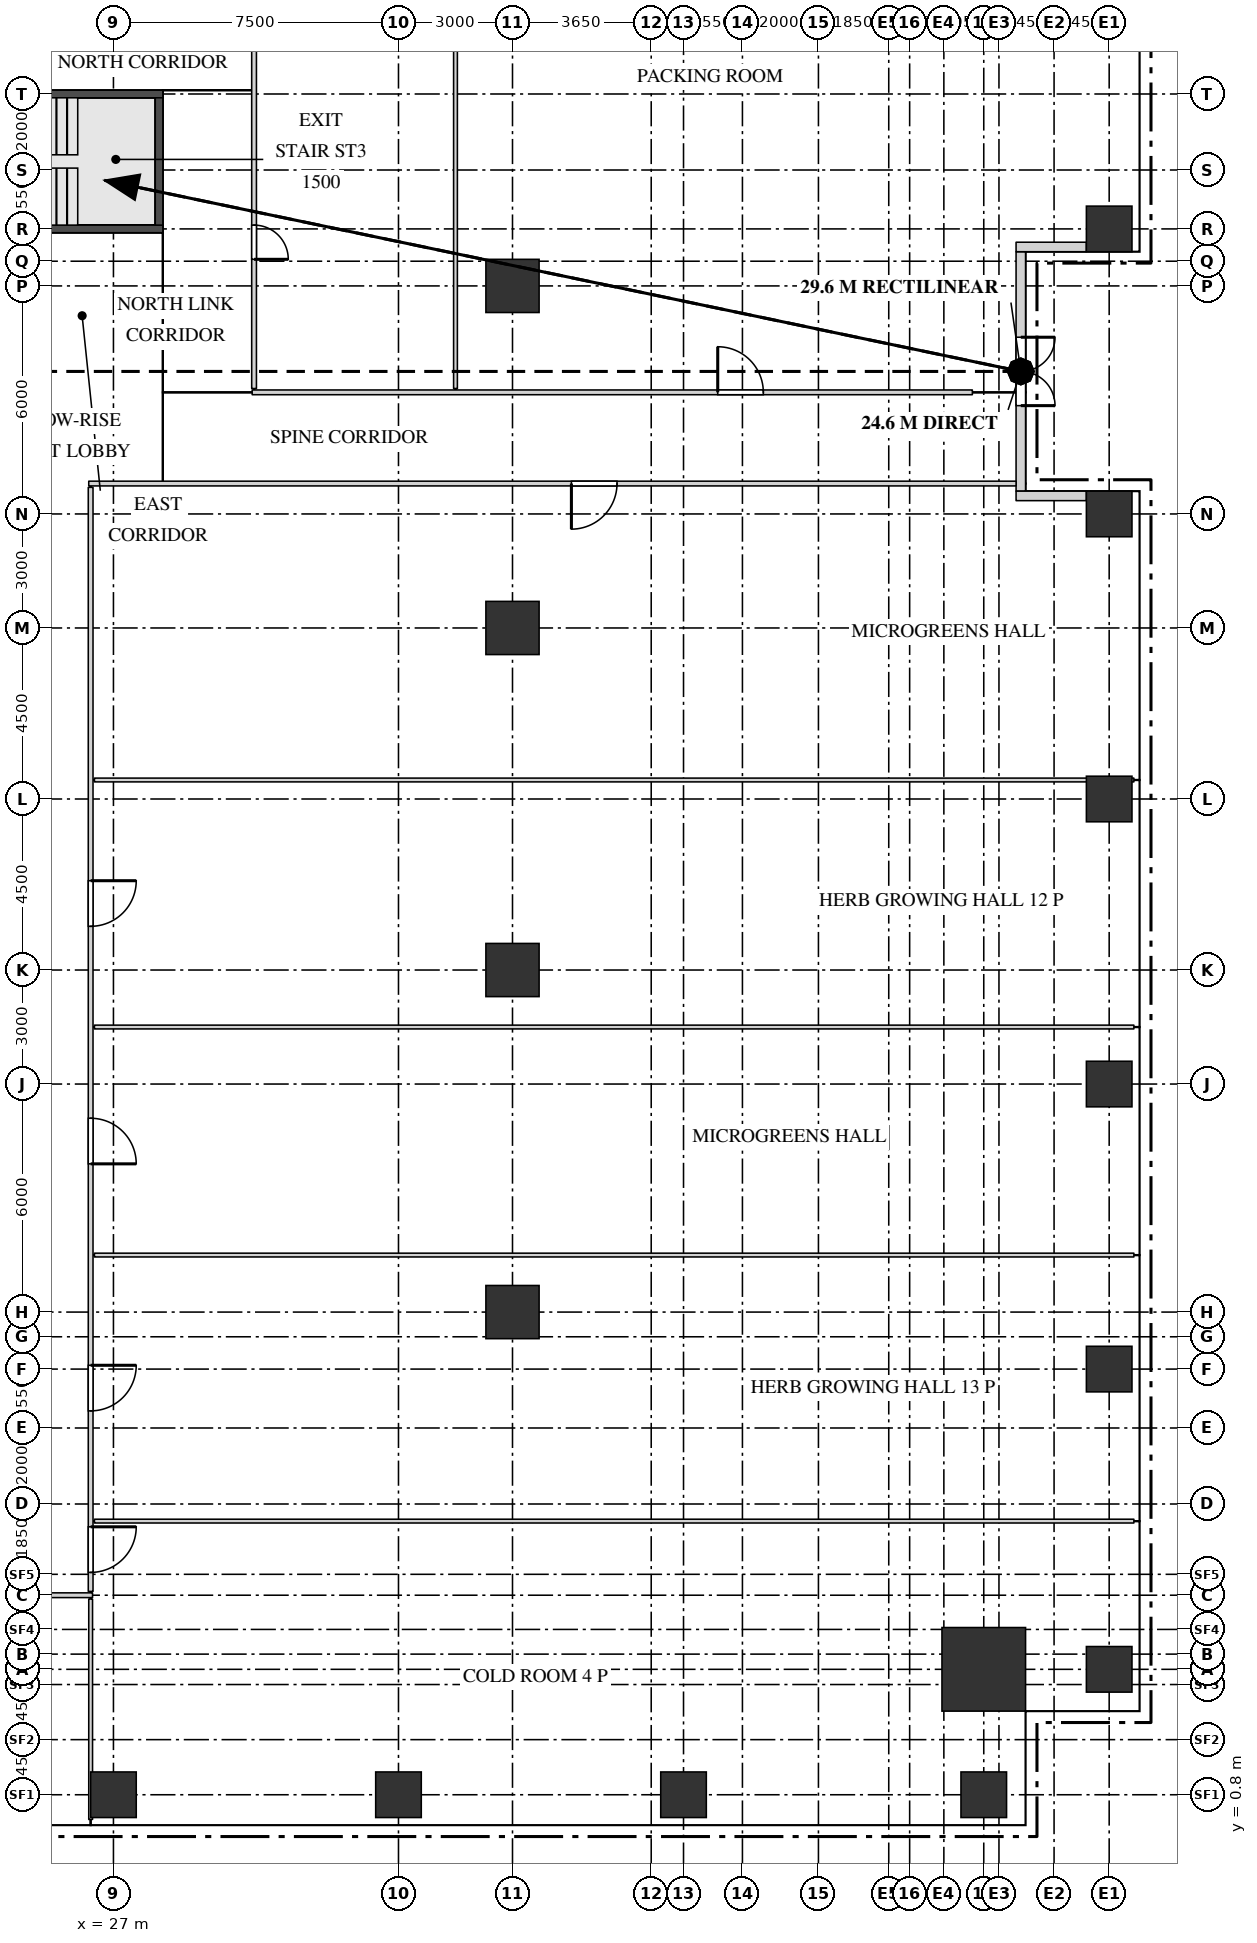
"""IFC4 building model, lengths in metres.
Left out: names, types, materials, properties, quantities, classifications, styles, units other than length and angle.
Written with IfcOpenShell. Run it as: python <this file> out.ifc"""

import sys

from ifc_helpers import new_model, si_unit, direction, frame, frame_2d, origin, origin_2d, place, context, subcontext, project, spatial, rectangle, extrude, source, transform, mapped, element, fill, save


model = new_model("IFC4")
c1 = context("Model", 3, precision=1e-05, world=origin(), true_north=direction((0.0, 1.0)))
c2 = subcontext(c1, "Body", "Model", "MODEL_VIEW")
j1 = project(units=[si_unit("LENGTHUNIT", "METRE"), si_unit("PLANEANGLEUNIT", "RADIAN")], contexts=[c1])
p1 = place(None, origin())
s1 = spatial("IfcSite", under=j1, at=p1, CompositionType="ELEMENT")
p2 = place(p1, origin())
s2 = spatial("IfcBuilding", under=s1, at=p2, CompositionType="ELEMENT")
p3 = place(p2, frame((0.0, 0.0, 60.0)))
s3 = spatial("IfcBuildingStorey", under=s2, at=p3, CompositionType="ELEMENT", Elevation=60.0)
m1 = source(origin(), c2, "Body", "SweptSolid", [
    extrude(rectangle(XDim=7.1, YDim=0.2, at=frame_2d((3.55, 0.0))), origin(), (0.0, 0.0, 1.0), 4.2),
])
p4 = place(p3, frame((21.2, 45.55, 0.0), z_axis=(0.0, 0.0, 1.0), x_axis=(1.0, 0.0, 0.0)))
e1 = element("IfcWall", 1, at=p4, inside=s3, PredefinedType="SHEAR", context=c2, shape_type="MappedRepresentation", body=[
    mapped(m1, transform((0.0, 0.0, 0.0))),
])
m2 = source(origin(), c2, "Body", "SweptSolid", [
    extrude(rectangle(XDim=1.2, YDim=2.1, at=frame_2d((0.6, 1.05))), frame((0.0, 0.11, 0.0), z_axis=(0.0, -1.0, 0.0), x_axis=(1.0, 0.0, 0.0)), (0.0, 0.0, 1.0), 0.22),
])
p5 = place(p4, frame((0.15, 0.0, 0.0)))
e2 = element("IfcOpeningElement", 2, at=p5, cuts=e1, PredefinedType="OPENING", context=c2, shape_type="MappedRepresentation", body=[
    mapped(m2, transform((0.0, 0.0, 0.0))),
])
p6 = place(p3, frame((21.2, 42.0, 0.0), z_axis=(0.0, 0.0, 1.0), x_axis=(1.0, 0.0, 0.0)))
e3 = element("IfcWall", 3, at=p6, inside=s3, PredefinedType="SHEAR", context=c2, shape_type="MappedRepresentation", body=[
    mapped(m1, transform((0.0, 0.0, 0.0))),
])
m3 = source(origin(), c2, "Body", "SweptSolid", [
    extrude(rectangle(XDim=3.35, YDim=0.2, at=frame_2d((1.675, 0.0))), origin(), (0.0, 0.0, 1.0), 4.2),
])
p7 = place(p3, frame((28.2, 42.1, 0.0), z_axis=(0.0, 0.0, 1.0), x_axis=(0.0, 1.0, 0.0)))
e4 = element("IfcWall", 4, at=p7, inside=s3, PredefinedType="SHEAR", context=c2, shape_type="MappedRepresentation", body=[
    mapped(m3, transform((0.0, 0.0, 0.0))),
])
m4 = source(origin(), c2, "Body", "SweptSolid", [
    extrude(rectangle(XDim=2.2, YDim=2.2, at=origin_2d()), origin(), (0.0, 0.0, 1.0), 4.5),
])
p8 = place(p3, frame((49.9, 4.1, 0.0), z_axis=(0.0, 0.0, 1.0), x_axis=(1.0, 0.0, 0.0)))
e5 = element("IfcColumn", 5, at=p8, inside=s3, PredefinedType="COLUMN", context=c2, shape_type="MappedRepresentation", body=[
    mapped(m4, transform((0.0, 0.0, 0.0))),
])
m5 = source(origin(), c2, "Body", "SweptSolid", [
    extrude(rectangle(XDim=1.2, YDim=1.2, at=origin_2d()), origin(), (0.0, 0.0, 1.0), 4.2),
])
for number, where, z_axis, x_axis in (
    (6, (27.0, 0.8, 0.0), (0.0, 0.0, 1.0), (1.0, 0.0, 0.0)),
    (7, (34.5, 0.8, 0.0), (0.0, 0.0, 1.0), (1.0, 0.0, 0.0)),
    (8, (42.0, 0.8, 0.0), (0.0, 0.0, 1.0), (1.0, 0.0, 0.0)),
    (9, (49.9, 0.8, 0.0), (0.0, 0.0, 1.0), (1.0, 0.0, 0.0)),
    (10, (53.2, 4.1, 0.0), (0.0, 0.0, 1.0), (1.0, 0.0, 0.0)),
    (11, (53.2, 12.0, 0.0), (0.0, 0.0, 1.0), (1.0, 0.0, 0.0)),
    (12, (53.2, 19.5, 0.0), (0.0, 0.0, 1.0), (1.0, 0.0, 0.0)),
    (13, (53.2, 27.0, 0.0), (0.0, 0.0, 1.0), (1.0, 0.0, 0.0)),
    (14, (53.2, 34.5, 0.0), (0.0, 0.0, 1.0), (1.0, 0.0, 0.0)),
    (15, (53.2, 42.0, 0.0), (0.0, 0.0, 1.0), (1.0, 0.0, 0.0)),
):
    element("IfcColumn", number, at=place(p3, frame(where, z_axis=z_axis, x_axis=x_axis)), inside=s3, PredefinedType="COLUMN", context=c2, shape_type="MappedRepresentation", body=[
        mapped(m5, transform((0.0, 0.0, 0.0))),
    ])
m6 = source(origin(), c2, "Body", "SweptSolid", [
    extrude(rectangle(XDim=1.4, YDim=1.4, at=origin_2d()), origin(), (0.0, 0.0, 1.0), 4.2),
])
for number, where, z_axis, x_axis in (
    (16, (37.5, 13.5, 0.0), (0.0, 0.0, 1.0), (1.0, 0.0, 0.0)),
    (17, (37.5, 22.5, 0.0), (0.0, 0.0, 1.0), (1.0, 0.0, 0.0)),
    (18, (37.5, 31.5, 0.0), (0.0, 0.0, 1.0), (1.0, 0.0, 0.0)),
    (19, (37.5, 40.5, 0.0), (0.0, 0.0, 1.0), (1.0, 0.0, 0.0)),
):
    element("IfcColumn", number, at=place(p3, frame(where, z_axis=z_axis, x_axis=x_axis)), inside=s3, PredefinedType="COLUMN", context=c2, shape_type="MappedRepresentation", body=[
        mapped(m6, transform((0.0, 0.0, 0.0))),
    ])
m7 = source(origin(), c2, "Body", "SweptSolid", [
    extrude(rectangle(XDim=6.3, YDim=0.25, at=frame_2d((3.15, 0.0))), origin(), (0.0, 0.0, 1.0), 3.6),
])
p9 = place(p3, frame((50.875, 35.1, 0.0), z_axis=(0.0, 0.0, 1.0), x_axis=(0.0, 1.0, 0.0)))
e20 = element("IfcWall", 20, at=p9, inside=s3, PredefinedType="SOLIDWALL", context=c2, shape_type="MappedRepresentation", body=[
    mapped(m7, transform((0.0, 0.0, 0.0))),
])
m8 = source(origin(), c2, "Body", "SweptSolid", [
    extrude(rectangle(XDim=1.6, YDim=2.4, at=frame_2d((0.8, 1.2))), frame((0.0, 0.135, 0.0), z_axis=(0.0, -1.0, 0.0), x_axis=(1.0, 0.0, 0.0)), (0.0, 0.0, 1.0), 0.27),
])
p10 = place(p9, frame((0.35, 0.0, 0.0)))
e21 = element("IfcOpeningElement", 21, at=p10, cuts=e20, PredefinedType="OPENING", context=c2, shape_type="MappedRepresentation", body=[
    mapped(m8, transform((0.0, 0.0, 0.0))),
])
p11 = place(p9, frame((4.35, 0.0, 0.0)))
e22 = element("IfcOpeningElement", 22, at=p11, cuts=e20, PredefinedType="OPENING", context=c2, shape_type="MappedRepresentation", body=[
    mapped(m8, transform((0.0, 0.0, 0.0))),
])
m9 = source(origin(), c2, "Body", "SweptSolid", [
    extrude(rectangle(XDim=1.8, YDim=2.4, at=frame_2d((0.9, 1.2))), frame((0.0, 0.135, 0.0), z_axis=(0.0, -1.0, 0.0), x_axis=(1.0, 0.0, 0.0)), (0.0, 0.0, 1.0), 0.27),
])
p12 = place(p9, frame((2.25, 0.0, 0.0)))
e23 = element("IfcOpeningElement", 23, at=p12, cuts=e20, PredefinedType="OPENING", context=c2, shape_type="MappedRepresentation", body=[
    mapped(m9, transform((0.0, 0.0, 0.0))),
])
m10 = source(origin(), c2, "Body", "SweptSolid", [
    extrude(rectangle(XDim=1.85, YDim=0.25, at=frame_2d((0.925, 0.0))), origin(), (0.0, 0.0, 1.0), 3.6),
])
for number, where, z_axis, x_axis in (
    (24, (52.6, 34.975, 0.0), (0.0, 0.0, 1.0), (-1.0, 0.0, 0.0)),
    (25, (52.6, 41.525, 0.0), (0.0, 0.0, 1.0), (-1.0, 0.0, 0.0)),
):
    element("IfcWall", number, at=place(p3, frame(where, z_axis=z_axis, x_axis=x_axis)), inside=s3, PredefinedType="SOLIDWALL", context=c2, shape_type="MappedRepresentation", body=[
        mapped(m10, transform((0.0, 0.0, 0.0))),
    ])
m11 = source(origin(), c2, "Body", "SweptSolid", [
    extrude(rectangle(XDim=5.8, YDim=0.1, at=frame_2d((2.9, 0.0))), origin(), (0.0, 0.0, 1.0), 4.3),
])
p13 = place(p3, frame((26.4, 0.15, 0.0), z_axis=(0.0, 0.0, 1.0), x_axis=(0.0, 1.0, 0.0)))
e26 = element("IfcWall", 26, at=p13, inside=s3, PredefinedType="PARTITIONING", context=c2, shape_type="MappedRepresentation", body=[
    mapped(m11, transform((0.0, 0.0, 0.0))),
])
m12 = source(origin(), c2, "Body", "SweptSolid", [
    extrude(rectangle(XDim=22.3, YDim=0.125, at=frame_2d((11.15, 0.0))), origin(), (0.0, 0.0, 1.0), 4.3),
])
p14 = place(p3, frame((4.15, 6.05, 0.0), z_axis=(0.0, 0.0, 1.0), x_axis=(1.0, 0.0, 0.0)))
e27 = element("IfcWall", 27, at=p14, inside=s3, PredefinedType="PARTITIONING", context=c2, shape_type="MappedRepresentation", body=[
    mapped(m12, transform((0.0, 0.0, 0.0))),
])
m13 = source(origin(), c2, "Body", "SweptSolid", [
    extrude(rectangle(XDim=0.9, YDim=2.1, at=frame_2d((0.45, 1.05))), frame((0.0, 0.073, 0.0), z_axis=(0.0, -1.0, 0.0), x_axis=(1.0, 0.0, 0.0)), (0.0, 0.0, 1.0), 0.145),
])
p15 = place(p14, frame((3.5, 0.0, 0.0)))
e28 = element("IfcOpeningElement", 28, at=p15, cuts=e27, PredefinedType="OPENING", context=c2, shape_type="MappedRepresentation", body=[
    mapped(m13, transform((0.0, 0.0, 0.0))),
])
m14 = source(origin(), c2, "Body", "SweptSolid", [
    extrude(rectangle(XDim=1.2, YDim=2.1, at=frame_2d((0.6, 1.05))), frame((0.0, 0.073, 0.0), z_axis=(0.0, -1.0, 0.0), x_axis=(1.0, 0.0, 0.0)), (0.0, 0.0, 1.0), 0.145),
])
p16 = place(p14, frame((13.25, 0.0, 0.0)))
e29 = element("IfcOpeningElement", 29, at=p16, cuts=e27, PredefinedType="OPENING", context=c2, shape_type="MappedRepresentation", body=[
    mapped(m14, transform((0.0, 0.0, 0.0))),
])
m15 = source(origin(), c2, "Body", "SweptSolid", [
    extrude(rectangle(XDim=29.05, YDim=0.125, at=frame_2d((14.525, 0.0))), origin(), (0.0, 0.0, 1.0), 4.3),
])
p17 = place(p3, frame((26.4, 6.15, 0.0), z_axis=(0.0, 0.0, 1.0), x_axis=(0.0, 1.0, 0.0)))
e30 = element("IfcWall", 30, at=p17, inside=s3, PredefinedType="PARTITIONING", context=c2, shape_type="MappedRepresentation", body=[
    mapped(m15, transform((0.0, 0.0, 0.0))),
])
p18 = place(p17, frame((0.5, 0.0, 0.0)))
e31 = element("IfcOpeningElement", 31, at=p18, cuts=e30, PredefinedType="OPENING", context=c2, shape_type="MappedRepresentation", body=[
    mapped(m14, transform((0.0, 0.0, 0.0))),
])
p19 = place(p17, frame((4.75, 0.0, 0.0)))
e32 = element("IfcOpeningElement", 32, at=p19, cuts=e30, PredefinedType="OPENING", context=c2, shape_type="MappedRepresentation", body=[
    mapped(m14, transform((0.0, 0.0, 0.0))),
])
p20 = place(p17, frame((11.25, 0.0, 0.0)))
e33 = element("IfcOpeningElement", 33, at=p20, cuts=e30, PredefinedType="OPENING", context=c2, shape_type="MappedRepresentation", body=[
    mapped(m14, transform((0.0, 0.0, 0.0))),
])
p21 = place(p17, frame((17.5, 0.0, 0.0)))
e34 = element("IfcOpeningElement", 34, at=p21, cuts=e30, PredefinedType="OPENING", context=c2, shape_type="MappedRepresentation", body=[
    mapped(m14, transform((0.0, 0.0, 0.0))),
])
m16 = source(origin(), c2, "Body", "SweptSolid", [
    extrude(rectangle(XDim=27.35, YDim=0.1, at=frame_2d((13.675, 0.0))), origin(), (0.0, 0.0, 1.0), 4.3),
])
for number, where, z_axis, x_axis in (
    (35, (26.5, 8.0, 0.0), (0.0, 0.0, 1.0), (1.0, 0.0, 0.0)),
    (36, (26.5, 15.0, 0.0), (0.0, 0.0, 1.0), (1.0, 0.0, 0.0)),
    (37, (26.5, 21.0, 0.0), (0.0, 0.0, 1.0), (1.0, 0.0, 0.0)),
    (38, (26.5, 27.5, 0.0), (0.0, 0.0, 1.0), (1.0, 0.0, 0.0)),
):
    element("IfcWall", number, at=place(p3, frame(where, z_axis=z_axis, x_axis=x_axis)), inside=s3, PredefinedType="PARTITIONING", context=c2, shape_type="MappedRepresentation", body=[
        mapped(m16, transform((0.0, 0.0, 0.0))),
    ])
m17 = source(origin(), c2, "Body", "SweptSolid", [
    extrude(rectangle(XDim=24.4, YDim=0.125, at=frame_2d((12.2, 0.0))), origin(), (0.0, 0.0, 1.0), 4.3),
])
p22 = place(p3, frame((26.35, 35.3, 0.0), z_axis=(0.0, 0.0, 1.0), x_axis=(1.0, 0.0, 0.0)))
e39 = element("IfcWall", 39, at=p22, inside=s3, PredefinedType="PARTITIONING", context=c2, shape_type="MappedRepresentation", body=[
    mapped(m17, transform((0.0, 0.0, 0.0))),
])
p23 = place(p22, frame((12.7, 0.0, 0.0)))
e40 = element("IfcOpeningElement", 40, at=p23, cuts=e39, PredefinedType="OPENING", context=c2, shape_type="MappedRepresentation", body=[
    mapped(m14, transform((0.0, 0.0, 0.0))),
])
m18 = source(origin(), c2, "Body", "SweptSolid", [
    extrude(rectangle(XDim=18.95, YDim=0.125, at=frame_2d((9.475, 0.0))), origin(), (0.0, 0.0, 1.0), 4.3),
])
p24 = place(p3, frame((30.65, 37.7, 0.0), z_axis=(0.0, 0.0, 1.0), x_axis=(1.0, 0.0, 0.0)))
e41 = element("IfcWall", 41, at=p24, inside=s3, PredefinedType="PARTITIONING", context=c2, shape_type="MappedRepresentation", body=[
    mapped(m18, transform((0.0, 0.0, 0.0))),
])
p25 = place(p24, frame((12.25, 0.0, 0.0)))
e42 = element("IfcOpeningElement", 42, at=p25, cuts=e41, PredefinedType="OPENING", context=c2, shape_type="MappedRepresentation", body=[
    mapped(m14, transform((0.0, 0.0, 0.0))),
])
m19 = source(origin(), c2, "Body", "SweptSolid", [
    extrude(rectangle(XDim=10.15, YDim=0.125, at=frame_2d((5.075, 0.0))), origin(), (0.0, 0.0, 1.0), 4.3),
])
p26 = place(p3, frame((30.7, 37.8, 0.0), z_axis=(0.0, 0.0, 1.0), x_axis=(0.0, 1.0, 0.0)))
e43 = element("IfcWall", 43, at=p26, inside=s3, PredefinedType="PARTITIONING", context=c2, shape_type="MappedRepresentation", body=[
    mapped(m19, transform((0.0, 0.0, 0.0))),
])
p27 = place(p26, frame((3.4, 0.0, 0.0)))
e44 = element("IfcOpeningElement", 44, at=p27, cuts=e43, PredefinedType="OPENING", context=c2, shape_type="MappedRepresentation", body=[
    mapped(m13, transform((0.0, 0.0, 0.0))),
])
m20 = source(origin(), c2, "Body", "SweptSolid", [
    extrude(rectangle(XDim=16.05, YDim=0.1, at=frame_2d((8.025, 0.0))), origin(), (0.0, 0.0, 1.0), 4.3),
])
p28 = place(p3, frame((36.0, 37.8, 0.0), z_axis=(0.0, 0.0, 1.0), x_axis=(0.0, 1.0, 0.0)))
e45 = element("IfcWall", 45, at=p28, inside=s3, PredefinedType="PARTITIONING", context=c2, shape_type="MappedRepresentation", body=[
    mapped(m20, transform((0.0, 0.0, 0.0))),
])
m21 = source(origin(), c2, "Body", "SweptSolid", [
    extrude(rectangle(XDim=1.6, YDim=2.4, at=frame_2d((0.8, 1.2))), frame((0.0, 0.03, 0.0), z_axis=(0.0, -1.0, 0.0), x_axis=(1.0, 0.0, 0.0)), (0.0, 0.0, 1.0), 0.06),
])
p29 = place(p10, origin())
e46 = element("IfcWindow", 46, at=p29, inside=s3, PartitioningType="SINGLE_PANEL", PredefinedType="WINDOW", context=c2, shape_type="MappedRepresentation", body=[
    mapped(m21, transform((0.0, 0.0, 0.0))),
])
fill(e21, e46)
p30 = place(p11, origin())
e47 = element("IfcWindow", 47, at=p30, inside=s3, PartitioningType="SINGLE_PANEL", PredefinedType="WINDOW", context=c2, shape_type="MappedRepresentation", body=[
    mapped(m21, transform((0.0, 0.0, 0.0))),
])
fill(e22, e47)
m22 = source(origin(), c2, "Body", "SweptSolid", [
    extrude(rectangle(XDim=1.8, YDim=2.4, at=frame_2d((0.9, 1.2))), frame((0.0, 0.025, 0.0), z_axis=(0.0, -1.0, 0.0), x_axis=(1.0, 0.0, 0.0)), (0.0, 0.0, 1.0), 0.05),
])
p31 = place(p12, origin())
e48 = element("IfcDoor", 48, at=p31, inside=s3, OperationType="DOUBLE_DOOR_DOUBLE_SWING", PredefinedType="DOOR", context=c2, shape_type="MappedRepresentation", body=[
    mapped(m22, transform((0.0, 0.0, 0.0))),
])
fill(e23, e48)
m23 = source(origin(), c2, "Body", "SweptSolid", [
    extrude(rectangle(XDim=1.2, YDim=2.1, at=frame_2d((0.6, 1.05))), frame((0.0, 0.025, 0.0), z_axis=(0.0, -1.0, 0.0), x_axis=(1.0, 0.0, 0.0)), (0.0, 0.0, 1.0), 0.05),
])
p32 = place(p18, origin())
e49 = element("IfcDoor", 49, at=p32, inside=s3, OperationType="SINGLE_SWING_RIGHT", PredefinedType="DOOR", context=c2, shape_type="MappedRepresentation", body=[
    mapped(m23, transform((0.0, 0.0, 0.0))),
])
fill(e31, e49)
p33 = place(p19, origin())
e50 = element("IfcDoor", 50, at=p33, inside=s3, OperationType="SINGLE_SWING_RIGHT", PredefinedType="DOOR", context=c2, shape_type="MappedRepresentation", body=[
    mapped(m23, transform((0.0, 0.0, 0.0))),
])
fill(e32, e50)
p34 = place(p20, origin())
e51 = element("IfcDoor", 51, at=p34, inside=s3, OperationType="SINGLE_SWING_LEFT", PredefinedType="DOOR", context=c2, shape_type="MappedRepresentation", body=[
    mapped(m23, transform((0.0, 0.0, 0.0))),
])
fill(e33, e51)
p35 = place(p21, origin())
e52 = element("IfcDoor", 52, at=p35, inside=s3, OperationType="SINGLE_SWING_RIGHT", PredefinedType="DOOR", context=c2, shape_type="MappedRepresentation", body=[
    mapped(m23, transform((0.0, 0.0, 0.0))),
])
fill(e34, e52)
p36 = place(p23, origin())
e53 = element("IfcDoor", 53, at=p36, inside=s3, OperationType="SINGLE_SWING_LEFT", PredefinedType="DOOR", context=c2, shape_type="MappedRepresentation", body=[
    mapped(m23, transform((0.0, 0.0, 0.0))),
])
fill(e40, e53)
m24 = source(origin(), c2, "Body", "SweptSolid", [
    extrude(rectangle(XDim=0.9, YDim=2.1, at=frame_2d((0.45, 1.05))), frame((0.0, 0.025, 0.0), z_axis=(0.0, -1.0, 0.0), x_axis=(1.0, 0.0, 0.0)), (0.0, 0.0, 1.0), 0.05),
])
p37 = place(p27, origin())
e54 = element("IfcDoor", 54, at=p37, inside=s3, OperationType="SINGLE_SWING_LEFT", PredefinedType="DOOR", context=c2, shape_type="MappedRepresentation", body=[
    mapped(m24, transform((0.0, 0.0, 0.0))),
])
fill(e44, e54)
p38 = place(p25, origin())
e55 = element("IfcDoor", 55, at=p38, inside=s3, OperationType="SINGLE_SWING_RIGHT", PredefinedType="DOOR", context=c2, shape_type="MappedRepresentation", body=[
    mapped(m23, transform((0.0, 0.0, 0.0))),
])
fill(e42, e55)
save(model, sys.argv[1])
